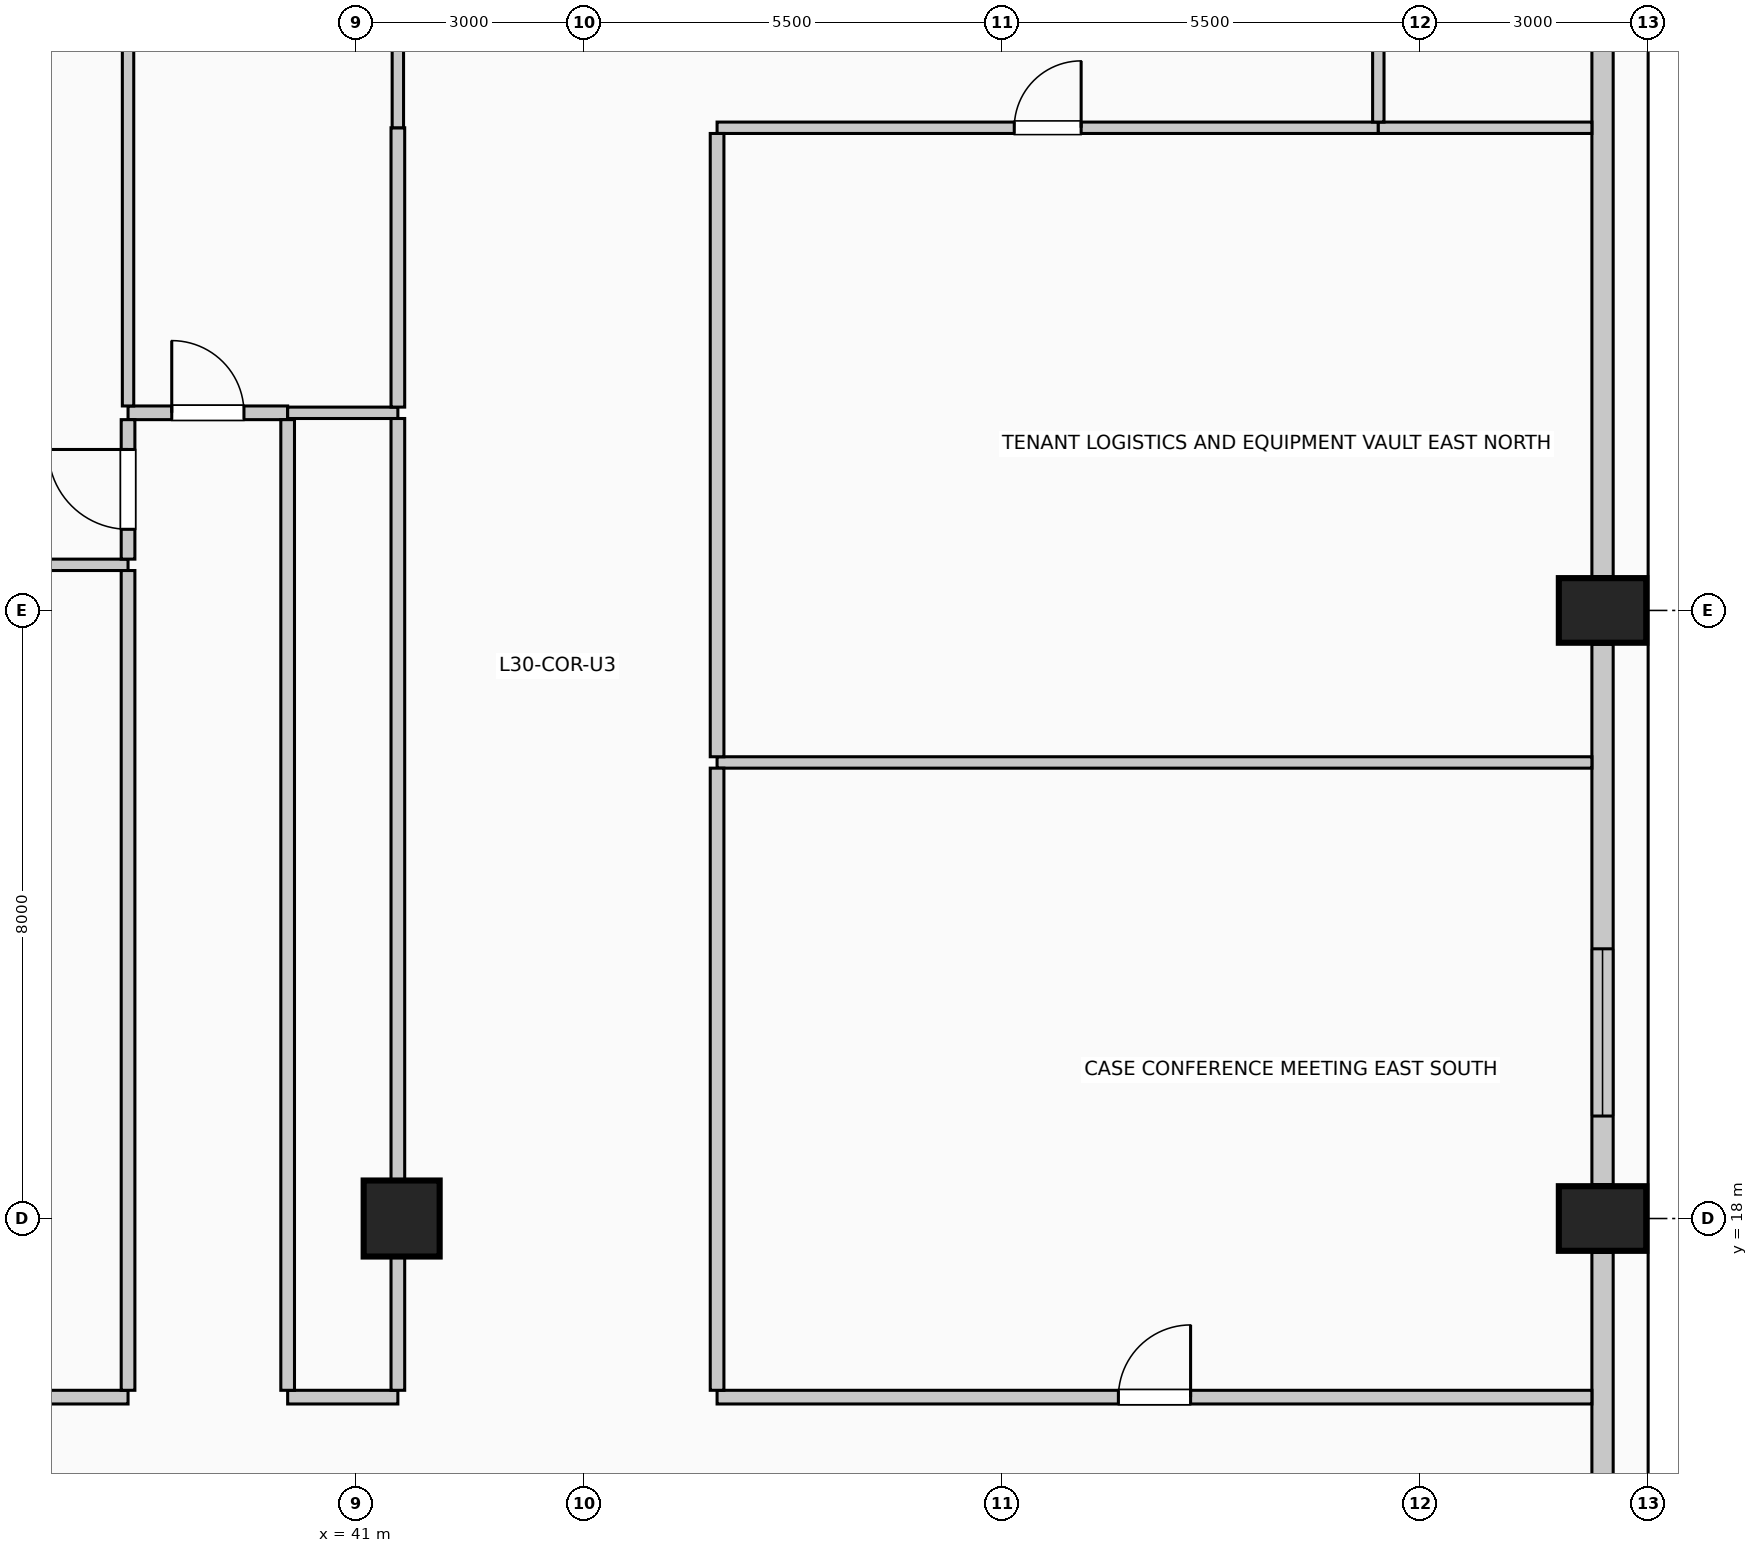
"""IFC4 building model, lengths in metres.
Left out: names, types, materials, properties, quantities, classifications, styles, units other than length and angle.
Written with IfcOpenShell. Run it as: python <this file> out.ifc"""

import sys

from ifc_helpers import new_model, si_unit, direction, frame, frame_2d, origin, origin_2d, place, context, subcontext, project, spatial, rectangle, circle, extrude, element, fill, save


model = new_model("IFC4")
c1 = context("Model", 3, precision=1e-05, world=origin(), true_north=direction((0.0, 1.0)))
c2 = subcontext(c1, "Body", "Model", "MODEL_VIEW")
j1 = project(units=[si_unit("LENGTHUNIT", "METRE"), si_unit("PLANEANGLEUNIT", "RADIAN")], contexts=[c1])
p1 = place(None, origin())
s1 = spatial("IfcSite", under=j1, at=p1, CompositionType="ELEMENT")
p2 = place(p1, origin())
s2 = spatial("IfcBuilding", under=s1, at=p2, CompositionType="ELEMENT")
p3 = place(p2, frame((0.0, 0.0, 124.6)))
s3 = spatial("IfcBuildingStorey", under=s2, at=p3, CompositionType="ELEMENT", Elevation=124.6)
for number, where, z_axis, x_axis in (
    (1, (57.4, 18.0, 0.0), (0.0, 0.0, 1.0), (0.0, 1.0, 0.0)),
    (2, (57.4, 26.0, 0.0), (0.0, 0.0, 1.0), (0.0, 1.0, 0.0)),
):
    element("IfcColumn", number, at=place(p3, frame(where, z_axis=z_axis, x_axis=x_axis)), inside=s3, PredefinedType="COLUMN", context=c2, shape_type="SweptSolid", body=[
        extrude(rectangle(XDim=0.85, YDim=1.15, at=origin_2d()), origin(), (0.0, 0.0, 1.0), 4.0),
    ])
p4 = place(p3, frame((41.6, 18.0, 0.0), z_axis=(0.0, 0.0, 1.0), x_axis=(1.0, 0.0, 0.0)))
e3 = element("IfcColumn", 3, at=p4, inside=s3, PredefinedType="COLUMN", context=c2, shape_type="SweptSolid", body=[
    extrude(circle(Radius=0.5, at=origin_2d()), origin(), (0.0, 0.0, 1.0), 4.0),
])
p5 = place(p3, frame((57.4, 17.555, 0.0), z_axis=(0.0, 0.0, 1.0), x_axis=(0.0, -1.0, 0.0)))
e4 = element("IfcWall", 4, at=p5, inside=s3, PredefinedType="SOLIDWALL", context=c2, shape_type="SweptSolid", body=[
    extrude(rectangle(XDim=7.11, YDim=0.28, at=frame_2d((3.555, 0.0))), origin(), (0.0, 0.0, 1.0), 2.875),
])
p6 = place(p3, frame((57.4, 25.555, 0.0), z_axis=(0.0, 0.0, 1.0), x_axis=(0.0, -1.0, 0.0)))
e5 = element("IfcWall", 5, at=p6, inside=s3, PredefinedType="SOLIDWALL", context=c2, shape_type="SweptSolid", body=[
    extrude(rectangle(XDim=7.11, YDim=0.28, at=frame_2d((3.555, 0.0))), origin(), (0.0, 0.0, 1.0), 2.875),
])
p7 = place(p6, frame((4.007, 0.0, 0.5)))
e6 = element("IfcOpeningElement", 6, at=p7, cuts=e5, PredefinedType="OPENING", context=c2, shape_type="SweptSolid", body=[
    extrude(rectangle(XDim=2.2, YDim=1.95, at=frame_2d((1.1, 0.975))), frame((0.0, 0.15, 0.0), z_axis=(0.0, -1.0, 0.0), x_axis=(1.0, 0.0, 0.0)), (0.0, 0.0, 1.0), 0.3),
])
p8 = place(p3, frame((57.4, 33.555, 0.0), z_axis=(0.0, 0.0, 1.0), x_axis=(0.0, -1.0, 0.0)))
e7 = element("IfcWall", 7, at=p8, inside=s3, PredefinedType="SOLIDWALL", context=c2, shape_type="SweptSolid", body=[
    extrude(rectangle(XDim=7.11, YDim=0.28, at=frame_2d((3.555, 0.0))), origin(), (0.0, 0.0, 1.0), 2.875),
])
p9 = place(p3, frame((16.65, 15.65, 0.0), z_axis=(0.0, 0.0, 1.0), x_axis=(1.0, 0.0, 0.0)))
e8 = element("IfcWall", 8, at=p9, inside=s3, PredefinedType="PARTITIONING", context=c2, shape_type="SweptSolid", body=[
    extrude(rectangle(XDim=21.35, YDim=0.18, at=frame_2d((10.675, 0.0))), origin(), (0.0, 0.0, 1.0), 3.725),
])
p10 = place(p9, frame((10.2, 0.0, 0.0)))
e9 = element("IfcOpeningElement", 9, at=p10, cuts=e8, PredefinedType="OPENING", context=c2, shape_type="SweptSolid", body=[
    extrude(rectangle(XDim=0.95, YDim=2.15, at=frame_2d((0.475, 1.075))), frame((0.0, 0.1, 0.0), z_axis=(0.0, -1.0, 0.0), x_axis=(1.0, 0.0, 0.0)), (0.0, 0.0, 1.0), 0.2),
])
p11 = place(p3, frame((40.1, 15.65, 0.0), z_axis=(0.0, 0.0, 1.0), x_axis=(1.0, 0.0, 0.0)))
e10 = element("IfcWall", 10, at=p11, inside=s3, PredefinedType="PARTITIONING", context=c2, shape_type="SweptSolid", body=[
    extrude(rectangle(XDim=1.45, YDim=0.18, at=frame_2d((0.725, 0.0))), origin(), (0.0, 0.0, 1.0), 3.725),
])
p12 = place(p3, frame((45.75, 15.65, 0.0), z_axis=(0.0, 0.0, 1.0), x_axis=(1.0, 0.0, 0.0)))
e11 = element("IfcWall", 11, at=p12, inside=s3, PredefinedType="PARTITIONING", context=c2, shape_type="SweptSolid", body=[
    extrude(rectangle(XDim=11.51, YDim=0.18, at=frame_2d((5.755, 0.0))), origin(), (0.0, 0.0, 1.0), 3.725),
])
p13 = place(p12, frame((5.28, 0.0, 0.0)))
e12 = element("IfcOpeningElement", 12, at=p13, cuts=e11, PredefinedType="OPENING", context=c2, shape_type="SweptSolid", body=[
    extrude(rectangle(XDim=0.95, YDim=2.15, at=frame_2d((0.475, 1.075))), frame((0.0, 0.1, 0.0), z_axis=(0.0, -1.0, 0.0), x_axis=(1.0, 0.0, 0.0)), (0.0, 0.0, 1.0), 0.2),
])
p14 = place(p3, frame((45.75, 24.0, 0.0), z_axis=(0.0, 0.0, 1.0), x_axis=(1.0, 0.0, 0.0)))
e13 = element("IfcWall", 13, at=p14, inside=s3, PredefinedType="PARTITIONING", context=c2, shape_type="SweptSolid", body=[
    extrude(rectangle(XDim=11.51, YDim=0.15, at=frame_2d((5.755, 0.0))), origin(), (0.0, 0.0, 1.0), 3.725),
])
p15 = place(p3, frame((16.65, 26.6, 0.0), z_axis=(0.0, 0.0, 1.0), x_axis=(1.0, 0.0, 0.0)))
e14 = element("IfcWall", 14, at=p15, inside=s3, PredefinedType="PARTITIONING", context=c2, shape_type="SweptSolid", body=[
    extrude(rectangle(XDim=21.35, YDim=0.15, at=frame_2d((10.675, 0.0))), origin(), (0.0, 0.0, 1.0), 3.725),
])
p16 = place(p3, frame((38.0, 28.6, 0.0), z_axis=(0.0, 0.0, 1.0), x_axis=(1.0, 0.0, 0.0)))
e15 = element("IfcWall", 15, at=p16, inside=s3, PredefinedType="PARTITIONING", context=c2, shape_type="SweptSolid", body=[
    extrude(rectangle(XDim=2.1, YDim=0.18, at=frame_2d((1.05, 0.0))), origin(), (0.0, 0.0, 1.0), 3.725),
])
p17 = place(p16, frame((0.575, 0.0, 0.0)))
e16 = element("IfcOpeningElement", 16, at=p17, cuts=e15, PredefinedType="OPENING", context=c2, shape_type="SweptSolid", body=[
    extrude(rectangle(XDim=0.95, YDim=2.15, at=frame_2d((0.475, 1.075))), frame((0.0, 0.1, 0.0), z_axis=(0.0, -1.0, 0.0), x_axis=(1.0, 0.0, 0.0)), (0.0, 0.0, 1.0), 0.2),
])
p18 = place(p3, frame((40.1, 28.6, 0.0), z_axis=(0.0, 0.0, 1.0), x_axis=(1.0, 0.0, 0.0)))
e17 = element("IfcWall", 17, at=p18, inside=s3, PredefinedType="PARTITIONING", context=c2, shape_type="SweptSolid", body=[
    extrude(rectangle(XDim=1.45, YDim=0.15, at=frame_2d((0.725, 0.0))), origin(), (0.0, 0.0, 1.0), 3.725),
])
p19 = place(p3, frame((45.75, 32.35, 0.0), z_axis=(0.0, 0.0, 1.0), x_axis=(1.0, 0.0, 0.0)))
e18 = element("IfcWall", 18, at=p19, inside=s3, PredefinedType="PARTITIONING", context=c2, shape_type="SweptSolid", body=[
    extrude(rectangle(XDim=8.7, YDim=0.15, at=frame_2d((4.35, 0.0))), origin(), (0.0, 0.0, 1.0), 3.725),
])
p20 = place(p19, frame((3.91, 0.0, 0.0)))
e19 = element("IfcOpeningElement", 19, at=p20, cuts=e18, PredefinedType="OPENING", context=c2, shape_type="SweptSolid", body=[
    extrude(rectangle(XDim=0.88, YDim=2.1, at=frame_2d((0.44, 1.05))), frame((0.0, 0.085, 0.0), z_axis=(0.0, -1.0, 0.0), x_axis=(1.0, 0.0, 0.0)), (0.0, 0.0, 1.0), 0.17),
])
p21 = place(p3, frame((54.45, 32.35, 0.0), z_axis=(0.0, 0.0, 1.0), x_axis=(1.0, 0.0, 0.0)))
e20 = element("IfcWall", 20, at=p21, inside=s3, PredefinedType="PARTITIONING", context=c2, shape_type="SweptSolid", body=[
    extrude(rectangle(XDim=2.81, YDim=0.15, at=frame_2d((1.405, 0.0))), origin(), (0.0, 0.0, 1.0), 3.725),
])
p22 = place(p3, frame((38.0, 15.74, 0.0), z_axis=(0.0, 0.0, 1.0), x_axis=(0.0, 1.0, 0.0)))
e21 = element("IfcWall", 21, at=p22, inside=s3, PredefinedType="PARTITIONING", context=c2, shape_type="SweptSolid", body=[
    extrude(rectangle(XDim=10.785, YDim=0.18, at=frame_2d((5.393, 0.0))), origin(), (0.0, 0.0, 1.0), 3.725),
])
p23 = place(p3, frame((38.0, 26.675, 0.0), z_axis=(0.0, 0.0, 1.0), x_axis=(0.0, 1.0, 0.0)))
e22 = element("IfcWall", 22, at=p23, inside=s3, PredefinedType="PARTITIONING", context=c2, shape_type="SweptSolid", body=[
    extrude(rectangle(XDim=1.835, YDim=0.18, at=frame_2d((0.917, 0.0))), origin(), (0.0, 0.0, 1.0), 3.725),
])
p24 = place(p23, frame((0.393, 0.0, 0.0)))
e23 = element("IfcOpeningElement", 23, at=p24, cuts=e22, PredefinedType="OPENING", context=c2, shape_type="SweptSolid", body=[
    extrude(rectangle(XDim=1.05, YDim=2.15, at=frame_2d((0.525, 1.075))), frame((0.0, 0.1, 0.0), z_axis=(0.0, -1.0, 0.0), x_axis=(1.0, 0.0, 0.0)), (0.0, 0.0, 1.0), 0.2),
])
p25 = place(p3, frame((38.0, 28.69, 0.0), z_axis=(0.0, 0.0, 1.0), x_axis=(0.0, 1.0, 0.0)))
e24 = element("IfcWall", 24, at=p25, inside=s3, PredefinedType="PARTITIONING", context=c2, shape_type="SweptSolid", body=[
    extrude(rectangle(XDim=16.57, YDim=0.15, at=frame_2d((8.285, 0.0))), origin(), (0.0, 0.0, 1.0), 3.725),
])
p26 = place(p3, frame((40.1, 15.74, 0.0), z_axis=(0.0, 0.0, 1.0), x_axis=(0.0, 1.0, 0.0)))
e25 = element("IfcWall", 25, at=p26, inside=s3, PredefinedType="PARTITIONING", context=c2, shape_type="SweptSolid", body=[
    extrude(rectangle(XDim=12.77, YDim=0.18, at=frame_2d((6.385, 0.0))), origin(), (0.0, 0.0, 1.0), 3.725),
])
p27 = place(p3, frame((41.55, 15.74, 0.0), z_axis=(0.0, 0.0, 1.0), x_axis=(0.0, 1.0, 0.0)))
e26 = element("IfcWall", 26, at=p27, inside=s3, PredefinedType="PARTITIONING", context=c2, shape_type="SweptSolid", body=[
    extrude(rectangle(XDim=1.76, YDim=0.18, at=frame_2d((0.88, 0.0))), origin(), (0.0, 0.0, 1.0), 3.07),
])
p28 = place(p3, frame((41.55, 18.5, 0.0), z_axis=(0.0, 0.0, 1.0), x_axis=(0.0, 1.0, 0.0)))
e27 = element("IfcWall", 27, at=p28, inside=s3, PredefinedType="PARTITIONING", context=c2, shape_type="SweptSolid", body=[
    extrude(rectangle(XDim=10.025, YDim=0.18, at=frame_2d((5.012, 0.0))), origin(), (0.0, 0.0, 1.0), 3.07),
])
p29 = place(p3, frame((41.55, 28.675, 0.0), z_axis=(0.0, 0.0, 1.0), x_axis=(0.0, 1.0, 0.0)))
e28 = element("IfcWall", 28, at=p29, inside=s3, PredefinedType="PARTITIONING", context=c2, shape_type="SweptSolid", body=[
    extrude(rectangle(XDim=3.675, YDim=0.18, at=frame_2d((1.837, 0.0))), origin(), (0.0, 0.0, 1.0), 3.07),
])
p30 = place(p3, frame((41.55, 32.35, 0.0), z_axis=(0.0, 0.0, 1.0), x_axis=(0.0, 1.0, 0.0)))
e29 = element("IfcWall", 29, at=p30, inside=s3, PredefinedType="PARTITIONING", context=c2, shape_type="SweptSolid", body=[
    extrude(rectangle(XDim=1.15, YDim=0.15, at=frame_2d((0.575, 0.0))), origin(), (0.0, 0.0, 1.0), 3.07),
])
p31 = place(p3, frame((45.75, 15.74, 0.0), z_axis=(0.0, 0.0, 1.0), x_axis=(0.0, 1.0, 0.0)))
e30 = element("IfcWall", 30, at=p31, inside=s3, PredefinedType="PARTITIONING", context=c2, shape_type="SweptSolid", body=[
    extrude(rectangle(XDim=8.185, YDim=0.18, at=frame_2d((4.093, 0.0))), origin(), (0.0, 0.0, 1.0), 3.725),
])
p32 = place(p3, frame((45.75, 24.075, 0.0), z_axis=(0.0, 0.0, 1.0), x_axis=(0.0, 1.0, 0.0)))
e31 = element("IfcWall", 31, at=p32, inside=s3, PredefinedType="PARTITIONING", context=c2, shape_type="SweptSolid", body=[
    extrude(rectangle(XDim=8.2, YDim=0.18, at=frame_2d((4.1, 0.0))), origin(), (0.0, 0.0, 1.0), 3.725),
])
p33 = place(p3, frame((54.45, 32.425, 0.0), z_axis=(0.0, 0.0, 1.0), x_axis=(0.0, 1.0, 0.0)))
e32 = element("IfcWall", 32, at=p33, inside=s3, PredefinedType="PARTITIONING", context=c2, shape_type="SweptSolid", body=[
    extrude(rectangle(XDim=1.725, YDim=0.15, at=frame_2d((0.862, 0.0))), origin(), (0.0, 0.0, 1.0), 3.725),
])
p34 = place(p7, origin())
e33 = element("IfcWindow", 33, at=p34, inside=s3, PartitioningType="SINGLE_PANEL", PredefinedType="WINDOW", context=c2, shape_type="SweptSolid", body=[
    extrude(rectangle(XDim=2.2, YDim=1.95, at=frame_2d((1.1, 0.975))), frame((0.0, 0.03, 0.0), z_axis=(0.0, -1.0, 0.0), x_axis=(1.0, 0.0, 0.0)), (0.0, 0.0, 1.0), 0.06),
])
fill(e6, e33)
p35 = place(p13, origin())
e34 = element("IfcDoor", 34, at=p35, inside=s3, OperationType="SINGLE_SWING_RIGHT", PredefinedType="DOOR", context=c2, shape_type="SweptSolid", body=[
    extrude(rectangle(XDim=0.95, YDim=2.15, at=frame_2d((0.475, 1.075))), frame((0.0, 0.025, 0.0), z_axis=(0.0, -1.0, 0.0), x_axis=(1.0, 0.0, 0.0)), (0.0, 0.0, 1.0), 0.05),
])
fill(e12, e34)
p36 = place(p17, origin())
e35 = element("IfcDoor", 35, at=p36, inside=s3, OperationType="SINGLE_SWING_LEFT", PredefinedType="DOOR", context=c2, shape_type="SweptSolid", body=[
    extrude(rectangle(XDim=0.95, YDim=2.15, at=frame_2d((0.475, 1.075))), frame((0.0, 0.025, 0.0), z_axis=(0.0, -1.0, 0.0), x_axis=(1.0, 0.0, 0.0)), (0.0, 0.0, 1.0), 0.05),
])
fill(e16, e35)
p37 = place(p20, origin())
e36 = element("IfcDoor", 36, at=p37, inside=s3, OperationType="SINGLE_SWING_RIGHT", PredefinedType="DOOR", context=c2, shape_type="SweptSolid", body=[
    extrude(rectangle(XDim=0.88, YDim=2.1, at=frame_2d((0.44, 1.05))), frame((0.0, 0.025, 0.0), z_axis=(0.0, -1.0, 0.0), x_axis=(1.0, 0.0, 0.0)), (0.0, 0.0, 1.0), 0.05),
])
fill(e19, e36)
p38 = place(p24, origin())
e37 = element("IfcDoor", 37, at=p38, inside=s3, OperationType="SINGLE_SWING_RIGHT", PredefinedType="DOOR", context=c2, shape_type="SweptSolid", body=[
    extrude(rectangle(XDim=1.05, YDim=2.15, at=frame_2d((0.525, 1.075))), frame((0.0, 0.025, 0.0), z_axis=(0.0, -1.0, 0.0), x_axis=(1.0, 0.0, 0.0)), (0.0, 0.0, 1.0), 0.05),
])
fill(e23, e37)
save(model, sys.argv[1])
